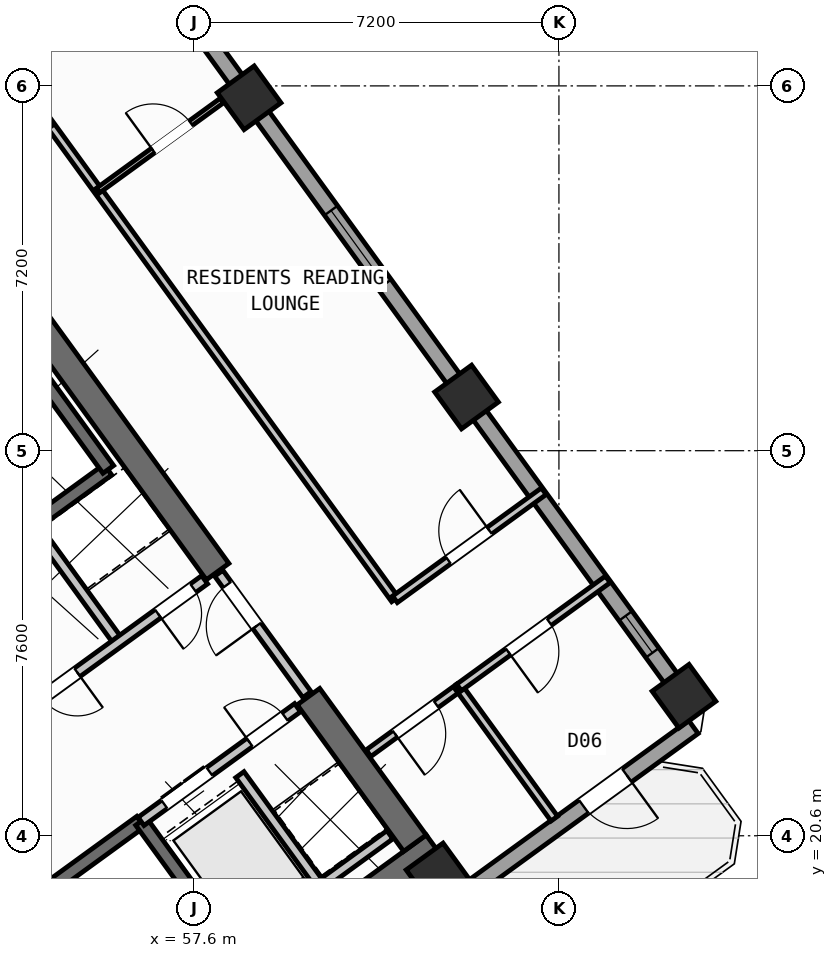
"""IFC4 building model, lengths in metres.
Left out: names, types, materials, properties, quantities, classifications, styles, units other than length and angle.
Written with IfcOpenShell. Run it as: python <this file> out.ifc"""

import sys

from ifc_helpers import new_model, si_unit, direction, frame, frame_2d, origin, origin_2d, place, context, subcontext, project, spatial, rectangle, hollow_rectangle, extrude, source, transform, mapped, element, fill, save


model = new_model("IFC4")
c1 = context("Model", 3, precision=1e-05, world=origin(), true_north=direction((0.0, 1.0)))
c2 = subcontext(c1, "Body", "Model", "MODEL_VIEW")
j1 = project(units=[si_unit("LENGTHUNIT", "METRE"), si_unit("PLANEANGLEUNIT", "RADIAN")], contexts=[c1])
p1 = place(None, origin())
s1 = spatial("IfcSite", under=j1, at=p1, CompositionType="ELEMENT")
p2 = place(p1, origin())
s2 = spatial("IfcBuilding", under=s1, at=p2, CompositionType="ELEMENT")
p3 = place(p2, frame((0.0, 0.0, 112.5)))
s3 = spatial("IfcBuildingStorey", under=s2, at=p3, CompositionType="ELEMENT", Elevation=112.5)
p4 = place(p3, frame((52.359, 13.14, 0.0), z_axis=(0.0, 0.0, 1.0), x_axis=(0.809014896919, 0.587788139183, 0.0)))
e1 = element("IfcWall", 1, at=p4, inside=s3, PredefinedType="SHEAR", context=c2, shape_type="SweptSolid", body=[
    extrude(rectangle(XDim=12.34, YDim=0.55, at=frame_2d((6.17, 0.0))), origin(), (0.0, 0.0, 1.0), 3.35),
])
p5 = place(p3, frame((61.958, 20.454, 0.0), z_axis=(0.0, 0.0, 1.0), x_axis=(-0.587802113096, 0.809004744015, 0.0)))
e2 = element("IfcWall", 2, at=p5, inside=s3, PredefinedType="SHEAR", context=c2, shape_type="SweptSolid", body=[
    extrude(rectangle(XDim=3.575, YDim=0.55, at=frame_2d((1.788, 0.0))), origin(), (0.0, 0.0, 1.0), 3.35),
])
p6 = place(p3, frame((58.064, 25.813, 0.0), z_axis=(0.0, 0.0, 1.0), x_axis=(-0.587764933797, 0.809031756236, 0.0)))
e3 = element("IfcWall", 3, at=p6, inside=s3, PredefinedType="SHEAR", context=c2, shape_type="SweptSolid", body=[
    extrude(rectangle(XDim=6.425, YDim=0.55, at=frame_2d((3.212, 0.0))), origin(), (0.0, 0.0, 1.0), 3.35),
])
m1 = source(origin(), c2, "Body", "SweptSolid", [
    extrude(hollow_rectangle(XDim=0.9, YDim=0.9, WallThickness=0.036, at=origin_2d()), origin(), (0.0, 0.0, 1.0), 3.6),
])
for number, where, z_axis, x_axis in (
    (4, (62.414, 19.827, 0.0), (0.0, 0.0, 1.0), (0.809, 0.588, 0.0)),
    (5, (67.268, 23.354, 0.0), (0.0, 0.0, 1.0), (0.809, 0.588, 0.0)),
    (6, (62.977, 29.259, 0.0), (0.0, 0.0, 1.0), (0.809, 0.588, 0.0)),
    (7, (58.686, 35.165, 0.0), (0.0, 0.0, 1.0), (0.809, 0.588, 0.0)),
):
    element("IfcColumn", number, at=place(p3, frame(where, z_axis=z_axis, x_axis=x_axis)), inside=s3, PredefinedType="COLUMN", context=c2, shape_type="MappedRepresentation", body=[
        mapped(m1, transform((0.0, 0.0, 0.0), scale=1.0)),
    ])
p7 = place(p3, frame((54.81, 40.5, 0.0), z_axis=(0.0, 0.0, 1.0), x_axis=(0.587783625747, -0.809018176127, 0.0)))
e8 = element("IfcWall", 8, at=p7, inside=s3, PredefinedType="STANDARD", context=c2, shape_type="SweptSolid", body=[
    extrude(rectangle(XDim=21.587, YDim=0.32, at=frame_2d((10.794, 0.0))), origin(), (0.0, 0.0, 1.0), 2.775),
])
p8 = place(p7, frame((2.381, 0.0, 0.8)))
e9 = element("IfcOpeningElement", 9, at=p8, cuts=e8, PredefinedType="OPENING", context=c2, shape_type="SweptSolid", body=[
    extrude(rectangle(XDim=2.1, YDim=1.55, at=frame_2d((1.05, 0.775))), frame((0.0, 0.17, 0.0), z_axis=(0.0, -1.0, 0.0), x_axis=(1.0, 0.0, 0.0)), (0.0, 0.0, 1.0), 0.34),
])
p9 = place(p7, frame((9.344, 0.0, 0.85)))
e10 = element("IfcOpeningElement", 10, at=p9, cuts=e8, PredefinedType="OPENING", context=c2, shape_type="SweptSolid", body=[
    extrude(rectangle(XDim=1.8, YDim=1.5, at=frame_2d((0.9, 0.75))), frame((0.0, 0.17, 0.0), z_axis=(0.0, -1.0, 0.0), x_axis=(1.0, 0.0, 0.0)), (0.0, 0.0, 1.0), 0.34),
])
p10 = place(p7, frame((19.234, 0.0, 1.0)))
e11 = element("IfcOpeningElement", 11, at=p10, cuts=e8, PredefinedType="OPENING", context=c2, shape_type="SweptSolid", body=[
    extrude(rectangle(XDim=0.9, YDim=1.25, at=frame_2d((0.45, 0.625))), frame((0.0, 0.17, 0.0), z_axis=(0.0, -1.0, 0.0), x_axis=(1.0, 0.0, 0.0)), (0.0, 0.0, 1.0), 0.34),
])
p11 = place(p3, frame((67.454, 22.747, 0.0), z_axis=(0.0, 0.0, 1.0), x_axis=(-0.809021120468, -0.587779573171, 0.0)))
e12 = element("IfcWall", 12, at=p11, inside=s3, PredefinedType="STANDARD", context=c2, shape_type="SweptSolid", body=[
    extrude(rectangle(XDim=17.588, YDim=0.32, at=frame_2d((8.794, 0.0))), origin(), (0.0, 0.0, 1.0), 3.35),
])
p12 = place(p11, frame((1.624, 0.0, 0.0)))
e13 = element("IfcOpeningElement", 13, at=p12, cuts=e12, PredefinedType="OPENING", context=c2, shape_type="SweptSolid", body=[
    extrude(rectangle(XDim=1.05, YDim=2.15, at=frame_2d((0.525, 1.075))), frame((0.0, 0.17, 0.0), z_axis=(0.0, -1.0, 0.0), x_axis=(1.0, 0.0, 0.0)), (0.0, 0.0, 1.0), 0.34),
])
p13 = place(p11, frame((8.144, 0.0, 0.8)))
e14 = element("IfcOpeningElement", 14, at=p13, cuts=e12, PredefinedType="OPENING", context=c2, shape_type="SweptSolid", body=[
    extrude(rectangle(XDim=2.1, YDim=1.55, at=frame_2d((1.05, 0.775))), frame((0.0, 0.17, 0.0), z_axis=(0.0, -1.0, 0.0), x_axis=(1.0, 0.0, 0.0)), (0.0, 0.0, 1.0), 0.34),
])
p14 = place(p11, frame((13.344, 0.0, 0.8)))
e15 = element("IfcOpeningElement", 15, at=p14, cuts=e12, PredefinedType="OPENING", context=c2, shape_type="SweptSolid", body=[
    extrude(rectangle(XDim=2.1, YDim=1.55, at=frame_2d((1.05, 0.775))), frame((0.0, 0.17, 0.0), z_axis=(0.0, -1.0, 0.0), x_axis=(1.0, 0.0, 0.0)), (0.0, 0.0, 1.0), 0.34),
])
p15 = place(p3, frame((49.863, 23.44, 0.0), z_axis=(0.0, 0.0, 1.0), x_axis=(0.809003474932, 0.587803859759, 0.0)))
e16 = element("IfcWall", 16, at=p15, inside=s3, PredefinedType="SHEAR", context=c2, shape_type="SweptSolid", body=[
    extrude(rectangle(XDim=7.46, YDim=0.26, at=frame_2d((3.73, 0.0))), origin(), (0.0, 0.0, 1.0), 3.35),
])
p16 = place(p15, frame((0.36, 0.0, 0.0)))
e17 = element("IfcOpeningElement", 17, at=p16, cuts=e16, PredefinedType="OPENING", context=c2, shape_type="SweptSolid", body=[
    extrude(rectangle(XDim=0.86, YDim=2.05, at=frame_2d((0.43, 1.025))), frame((0.0, 0.14, 0.0), z_axis=(0.0, -1.0, 0.0), x_axis=(1.0, 0.0, 0.0)), (0.0, 0.0, 1.0), 0.28),
])
p17 = place(p3, frame((55.906, 27.831, 0.0), z_axis=(0.0, 0.0, 1.0), x_axis=(-0.587804123638, 0.809003283204, 0.0)))
e18 = element("IfcWall", 18, at=p17, inside=s3, PredefinedType="SHEAR", context=c2, shape_type="SweptSolid", body=[
    extrude(rectangle(XDim=3.16, YDim=0.26, at=frame_2d((1.58, 0.0))), origin(), (0.0, 0.0, 1.0), 3.35),
])
p18 = place(p3, frame((50.615, 16.57, 0.0), z_axis=(0.0, 0.0, 1.0), x_axis=(0.809028366311, 0.587769599847, 0.0)))
e19 = element("IfcWall", 19, at=p18, inside=s3, PredefinedType="SHEAR", context=c2, shape_type="SweptSolid", body=[
    extrude(rectangle(XDim=7.33, YDim=0.26, at=frame_2d((3.665, 0.0))), origin(), (0.0, 0.0, 1.0), 3.35),
])
p19 = place(p18, frame((0.22, 0.0, 0.0)))
e20 = element("IfcOpeningElement", 20, at=p19, cuts=e19, PredefinedType="OPENING", context=c2, shape_type="SweptSolid", body=[
    extrude(rectangle(XDim=1.1, YDim=2.1, at=frame_2d((0.55, 1.05))), frame((0.0, 0.14, 0.0), z_axis=(0.0, -1.0, 0.0), x_axis=(1.0, 0.0, 0.0)), (0.0, 0.0, 1.0), 0.28),
])
p20 = place(p3, frame((58.41, 18.327, 0.0), z_axis=(0.0, 0.0, 1.0), x_axis=(-0.58776738483, 0.809029975545, 0.0)))
e21 = element("IfcWall", 21, at=p20, inside=s3, PredefinedType="SHEAR", context=c2, shape_type="SweptSolid", body=[
    extrude(rectangle(XDim=3.16, YDim=0.26, at=frame_2d((1.58, 0.0))), origin(), (0.0, 0.0, 1.0), 3.35),
])
p21 = place(p3, frame((56.553, 20.884, 0.0), z_axis=(0.0, 0.0, 1.0), x_axis=(0.809023564264, 0.58777620951, 0.0)))
e22 = element("IfcWall", 22, at=p21, inside=s3, PredefinedType="STANDARD", context=c2, shape_type="SweptSolid", body=[
    extrude(rectangle(XDim=3.818, YDim=0.2, at=frame_2d((1.909, 0.0))), origin(), (0.0, 0.0, 1.0), 3.34),
])
p22 = place(p21, frame((0.57, 0.0, 0.0)))
e23 = element("IfcOpeningElement", 23, at=p22, cuts=e22, PredefinedType="OPENING", context=c2, shape_type="SweptSolid", body=[
    extrude(rectangle(XDim=1.1, YDim=2.15, at=frame_2d((0.55, 1.075))), frame((0.0, 0.11, 0.0), z_axis=(0.0, -1.0, 0.0), x_axis=(1.0, 0.0, 0.0)), (0.0, 0.0, 1.0), 0.22),
])
p23 = place(p21, frame((2.65, 0.0, 0.0)))
e24 = element("IfcOpeningElement", 24, at=p23, cuts=e22, PredefinedType="OPENING", context=c2, shape_type="SweptSolid", body=[
    extrude(rectangle(XDim=0.86, YDim=2.05, at=frame_2d((0.43, 1.025))), frame((0.0, 0.11, 0.0), z_axis=(0.0, -1.0, 0.0), x_axis=(1.0, 0.0, 0.0)), (0.0, 0.0, 1.0), 0.22),
])
p24 = place(p3, frame((60.067, 19.655, 0.0), z_axis=(0.0, 0.0, 1.0), x_axis=(-0.587800520745, 0.809005900975, 0.0)))
e25 = element("IfcWall", 25, at=p24, inside=s3, PredefinedType="STANDARD", context=c2, shape_type="SweptSolid", body=[
    extrude(rectangle(XDim=2.66, YDim=0.2, at=frame_2d((1.33, 0.0))), origin(), (0.0, 0.0, 1.0), 3.34),
])
p25 = place(p3, frame((58.472, 18.447, 0.0), z_axis=(0.0, 0.0, 1.0), x_axis=(0.809018631237, 0.587782999339, 0.0)))
e26 = element("IfcWall", 26, at=p25, inside=s3, PredefinedType="STANDARD", context=c2, shape_type="SweptSolid", body=[
    extrude(rectangle(XDim=3.698, YDim=0.2, at=frame_2d((1.849, 0.0))), origin(), (0.0, 0.0, 1.0), 3.34),
])
p26 = place(p3, frame((56.111, 24.419, 0.0), z_axis=(0.0, 0.0, 1.0), x_axis=(-0.58777848983, 0.809021907548, 0.0)))
e27 = element("IfcWall", 27, at=p26, inside=s3, PredefinedType="STANDARD", context=c2, shape_type="SweptSolid", body=[
    extrude(rectangle(XDim=2.88, YDim=0.2, at=frame_2d((1.44, 0.0))), origin(), (0.0, 0.0, 1.0), 3.34),
])
p27 = place(p3, frame((53.425, 22.468, 0.0), z_axis=(0.0, 0.0, 1.0), x_axis=(0.809024377198, 0.587775090574, 0.0)))
e28 = element("IfcWall", 28, at=p27, inside=s3, PredefinedType="STANDARD", context=c2, shape_type="SweptSolid", body=[
    extrude(rectangle(XDim=5.418, YDim=0.2, at=frame_2d((2.709, 0.0))), origin(), (0.0, 0.0, 1.0), 3.34),
])
p28 = place(p27, frame((4.28, 0.0, 0.0)))
e29 = element("IfcOpeningElement", 29, at=p28, cuts=e28, PredefinedType="OPENING", context=c2, shape_type="SweptSolid", body=[
    extrude(rectangle(XDim=0.86, YDim=2.05, at=frame_2d((0.43, 1.025))), frame((0.0, 0.11, 0.0), z_axis=(0.0, -1.0, 0.0), x_axis=(1.0, 0.0, 0.0)), (0.0, 0.0, 1.0), 0.22),
])
p29 = place(p27, frame((1.45, 0.0, 0.0)))
e30 = element("IfcOpeningElement", 30, at=p29, cuts=e28, PredefinedType="OPENING", context=c2, shape_type="SweptSolid", body=[
    extrude(rectangle(XDim=0.86, YDim=2.05, at=frame_2d((0.43, 1.025))), frame((0.0, 0.11, 0.0), z_axis=(0.0, -1.0, 0.0), x_axis=(1.0, 0.0, 0.0)), (0.0, 0.0, 1.0), 0.22),
])
p30 = place(p3, frame((59.827, 23.386, 0.0), z_axis=(0.0, 0.0, 1.0), x_axis=(-0.587803840107, 0.809003489211, 0.0)))
e31 = element("IfcWall", 31, at=p30, inside=s3, PredefinedType="STANDARD", context=c2, shape_type="SweptSolid", body=[
    extrude(rectangle(XDim=2.96, YDim=0.2, at=frame_2d((1.48, 0.0))), origin(), (0.0, 0.0, 1.0), 3.34),
])
p31 = place(p30, frame((1.68, 0.0, 0.0)))
e32 = element("IfcOpeningElement", 32, at=p31, cuts=e31, PredefinedType="OPENING", context=c2, shape_type="SweptSolid", body=[
    extrude(rectangle(XDim=1.0, YDim=2.1, at=frame_2d((0.5, 1.05))), frame((0.0, 0.11, 0.0), z_axis=(0.0, -1.0, 0.0), x_axis=(1.0, 0.0, 0.0)), (0.0, 0.0, 1.0), 0.22),
])
p32 = place(p3, frame((61.042, 22.229, 0.0), z_axis=(0.0, 0.0, 1.0), x_axis=(0.809075443949, 0.587704794942, 0.0)))
e33 = element("IfcWall", 33, at=p32, inside=s3, PredefinedType="PARTITIONING", context=c2, shape_type="SweptSolid", body=[
    extrude(rectangle(XDim=2.208, YDim=0.16, at=frame_2d((1.104, 0.0))), origin(), (0.0, 0.0, 1.0), 3.34),
])
p33 = place(p32, frame((0.648, 0.0, 0.0)))
e34 = element("IfcOpeningElement", 34, at=p33, cuts=e33, PredefinedType="OPENING", context=c2, shape_type="SweptSolid", body=[
    extrude(rectangle(XDim=1.0, YDim=2.1, at=frame_2d((0.5, 1.05))), frame((0.0, 0.09, 0.0), z_axis=(0.0, -1.0, 0.0), x_axis=(1.0, 0.0, 0.0)), (0.0, 0.0, 1.0), 0.18),
])
p34 = place(p3, frame((52.739, 33.143, 0.0), z_axis=(0.0, 0.0, 1.0), x_axis=(0.809000999347, 0.58780726693, 0.0)))
e35 = element("IfcWall", 35, at=p34, inside=s3, PredefinedType="PARTITIONING", context=c2, shape_type="SweptSolid", body=[
    extrude(rectangle(XDim=2.51, YDim=0.16, at=frame_2d((1.255, 0.0))), origin(), (0.0, 0.0, 1.0), 3.34),
])
p35 = place(p3, frame((64.709, 20.938, 0.0), z_axis=(0.0, 0.0, 1.0), x_axis=(-0.587772420479, 0.809026317077, 0.0)))
e36 = element("IfcWall", 36, at=p35, inside=s3, PredefinedType="PARTITIONING", context=c2, shape_type="SweptSolid", body=[
    extrude(rectangle(XDim=3.2, YDim=0.16, at=frame_2d((1.6, 0.0))), origin(), (0.0, 0.0, 1.0), 3.34),
])
p36 = place(p3, frame((61.564, 25.266, 0.0), z_axis=(0.0, 0.0, 1.0), x_axis=(-0.587784527444, 0.809017521007, 0.0)))
e37 = element("IfcWall", 37, at=p36, inside=s3, PredefinedType="PARTITIONING", context=c2, shape_type="SweptSolid", body=[
    extrude(rectangle(XDim=16.35, YDim=0.16, at=frame_2d((8.175, 0.0))), origin(), (0.0, 0.0, 1.0), 3.34),
])
p37 = place(p3, frame((62.828, 23.527, 0.0), z_axis=(0.0, 0.0, 1.0), x_axis=(0.809003564202, 0.587803736896, 0.0)))
e38 = element("IfcWall", 38, at=p37, inside=s3, PredefinedType="PARTITIONING", context=c2, shape_type="SweptSolid", body=[
    extrude(rectangle(XDim=3.63, YDim=0.16, at=frame_2d((1.815, 0.0))), origin(), (0.0, 0.0, 1.0), 3.34),
])
p38 = place(p37, frame((1.2, 0.0, 0.0)))
e39 = element("IfcOpeningElement", 39, at=p38, cuts=e38, PredefinedType="OPENING", context=c2, shape_type="SweptSolid", body=[
    extrude(rectangle(XDim=1.0, YDim=2.1, at=frame_2d((0.5, 1.05))), frame((0.0, 0.09, 0.0), z_axis=(0.0, -1.0, 0.0), x_axis=(1.0, 0.0, 0.0)), (0.0, 0.0, 1.0), 0.18),
])
p39 = place(p3, frame((61.564, 25.266, 0.0), z_axis=(0.0, 0.0, 1.0), x_axis=(0.809012309495, 0.587791700422, 0.0)))
e40 = element("IfcWall", 40, at=p39, inside=s3, PredefinedType="PARTITIONING", context=c2, shape_type="SweptSolid", body=[
    extrude(rectangle(XDim=3.63, YDim=0.16, at=frame_2d((1.815, 0.0))), origin(), (0.0, 0.0, 1.0), 3.34),
])
p40 = place(p39, frame((1.305, 0.0, 0.0)))
e41 = element("IfcOpeningElement", 41, at=p40, cuts=e40, PredefinedType="OPENING", context=c2, shape_type="SweptSolid", body=[
    extrude(rectangle(XDim=1.0, YDim=2.1, at=frame_2d((0.5, 1.05))), frame((0.0, 0.09, 0.0), z_axis=(0.0, -1.0, 0.0), x_axis=(1.0, 0.0, 0.0)), (0.0, 0.0, 1.0), 0.18),
])
p41 = place(p3, frame((55.703, 33.334, 0.0), z_axis=(0.0, 0.0, 1.0), x_axis=(0.809021891479, 0.587778511948, 0.0)))
e42 = element("IfcWall", 42, at=p41, inside=s3, PredefinedType="PARTITIONING", context=c2, shape_type="SweptSolid", body=[
    extrude(rectangle(XDim=3.028, YDim=0.11, at=frame_2d((1.514, 0.0))), origin(), (0.0, 0.0, 1.0), 2.775),
])
p42 = place(p41, frame((1.345, 0.0, 0.0)))
e43 = element("IfcOpeningElement", 43, at=p42, cuts=e42, PredefinedType="OPENING", context=c2, shape_type="SweptSolid", body=[
    extrude(rectangle(XDim=0.92, YDim=2.08, at=frame_2d((0.46, 1.04))), frame((0.0, 0.065, 0.0), z_axis=(0.0, -1.0, 0.0), x_axis=(1.0, 0.0, 0.0)), (0.0, 0.0, 1.0), 0.13),
])
m2 = source(origin(), c2, "Body", "SweptSolid", [
    extrude(rectangle(XDim=1.05, YDim=2.15, at=frame_2d((0.525, 1.075))), frame((0.0, 0.025, 0.0), z_axis=(0.0, -1.0, 0.0), x_axis=(1.0, 0.0, 0.0)), (0.0, 0.0, 1.0), 0.05),
])
p43 = place(p12, origin())
e44 = element("IfcDoor", 44, at=p43, inside=s3, OperationType="SINGLE_SWING_LEFT", PredefinedType="DOOR", context=c2, shape_type="MappedRepresentation", body=[
    mapped(m2, transform((0.0, 0.0, 0.0), scale=1.0)),
])
fill(e13, e44)
m3 = source(origin(), c2, "Body", "SweptSolid", [
    extrude(rectangle(XDim=1.8, YDim=1.5, at=frame_2d((0.9, 0.75))), frame((0.0, 0.03, 0.0), z_axis=(0.0, -1.0, 0.0), x_axis=(1.0, 0.0, 0.0)), (0.0, 0.0, 1.0), 0.06),
])
p44 = place(p9, origin())
e45 = element("IfcWindow", 45, at=p44, inside=s3, PartitioningType="SINGLE_PANEL", PredefinedType="WINDOW", context=c2, shape_type="MappedRepresentation", body=[
    mapped(m3, transform((0.0, 0.0, 0.0), scale=1.0)),
])
fill(e10, e45)
m4 = source(origin(), c2, "Body", "SweptSolid", [
    extrude(rectangle(XDim=0.9, YDim=1.25, at=frame_2d((0.45, 0.625))), frame((0.0, 0.03, 0.0), z_axis=(0.0, -1.0, 0.0), x_axis=(1.0, 0.0, 0.0)), (0.0, 0.0, 1.0), 0.06),
])
p45 = place(p10, origin())
e46 = element("IfcWindow", 46, at=p45, inside=s3, PartitioningType="SINGLE_PANEL", PredefinedType="WINDOW", context=c2, shape_type="MappedRepresentation", body=[
    mapped(m4, transform((0.0, 0.0, 0.0), scale=1.0)),
])
fill(e11, e46)
m5 = source(origin(), c2, "Body", "SweptSolid", [
    extrude(rectangle(XDim=1.1, YDim=2.15, at=frame_2d((0.55, 1.075))), frame((0.0, 0.025, 0.0), z_axis=(0.0, -1.0, 0.0), x_axis=(1.0, 0.0, 0.0)), (0.0, 0.0, 1.0), 0.05),
])
p46 = place(p22, origin())
e47 = element("IfcDoor", 47, at=p46, inside=s3, OperationType="DOUBLE_DOOR_SLIDING", PredefinedType="DOOR", context=c2, shape_type="MappedRepresentation", body=[
    mapped(m5, transform((0.0, 0.0, 0.0), scale=1.0)),
])
fill(e23, e47)
m6 = source(origin(), c2, "Body", "SweptSolid", [
    extrude(rectangle(XDim=0.86, YDim=2.05, at=frame_2d((0.43, 1.025))), frame((0.0, 0.025, 0.0), z_axis=(0.0, -1.0, 0.0), x_axis=(1.0, 0.0, 0.0)), (0.0, 0.0, 1.0), 0.05),
])
p47 = place(p23, origin())
e48 = element("IfcDoor", 48, at=p47, inside=s3, OperationType="SINGLE_SWING_LEFT", PredefinedType="DOOR", context=c2, shape_type="MappedRepresentation", body=[
    mapped(m6, transform((0.0, 0.0, 0.0), scale=1.0)),
])
fill(e24, e48)
p48 = place(p28, frame((0.86, 0.0, 0.0), z_axis=(0.0, 0.0, 1.0), x_axis=(-1.0, 0.0, 0.0)))
e49 = element("IfcDoor", 49, at=p48, inside=s3, OperationType="SINGLE_SWING_RIGHT", PredefinedType="DOOR", context=c2, shape_type="MappedRepresentation", body=[
    mapped(m6, transform((0.0, 0.0, 0.0), scale=1.0)),
])
fill(e29, e49)
p49 = place(p29, frame((0.86, 0.0, 0.0), z_axis=(0.0, 0.0, 1.0), x_axis=(-1.0, 0.0, 0.0)))
e50 = element("IfcDoor", 50, at=p49, inside=s3, OperationType="SINGLE_SWING_LEFT", PredefinedType="DOOR", context=c2, shape_type="MappedRepresentation", body=[
    mapped(m6, transform((0.0, 0.0, 0.0), scale=1.0)),
])
fill(e30, e50)
m7 = source(origin(), c2, "Body", "SweptSolid", [
    extrude(rectangle(XDim=1.0, YDim=2.1, at=frame_2d((0.5, 1.05))), frame((0.0, 0.025, 0.0), z_axis=(0.0, -1.0, 0.0), x_axis=(1.0, 0.0, 0.0)), (0.0, 0.0, 1.0), 0.05),
])
p50 = place(p33, frame((1.0, 0.0, 0.0), z_axis=(0.0, 0.0, 1.0), x_axis=(-1.0, 0.0, 0.0)))
e51 = element("IfcDoor", 51, at=p50, inside=s3, OperationType="SINGLE_SWING_RIGHT", PredefinedType="DOOR", context=c2, shape_type="MappedRepresentation", body=[
    mapped(m7, transform((0.0, 0.0, 0.0), scale=1.0)),
])
fill(e34, e51)
p51 = place(p31, origin())
e52 = element("IfcDoor", 52, at=p51, inside=s3, OperationType="SINGLE_SWING_LEFT", PredefinedType="DOOR", context=c2, shape_type="MappedRepresentation", body=[
    mapped(m7, transform((0.0, 0.0, 0.0), scale=1.0)),
])
fill(e32, e52)
p52 = place(p40, origin())
e53 = element("IfcDoor", 53, at=p52, inside=s3, OperationType="SINGLE_SWING_RIGHT", PredefinedType="DOOR", context=c2, shape_type="MappedRepresentation", body=[
    mapped(m7, transform((0.0, 0.0, 0.0), scale=1.0)),
])
fill(e41, e53)
m8 = source(origin(), c2, "Body", "SweptSolid", [
    extrude(rectangle(XDim=0.92, YDim=2.08, at=frame_2d((0.46, 1.04))), frame((0.0, 0.025, 0.0), z_axis=(0.0, -1.0, 0.0), x_axis=(1.0, 0.0, 0.0)), (0.0, 0.0, 1.0), 0.05),
])
p53 = place(p42, origin())
e54 = element("IfcDoor", 54, at=p53, inside=s3, OperationType="SINGLE_SWING_LEFT", PredefinedType="DOOR", context=c2, shape_type="MappedRepresentation", body=[
    mapped(m8, transform((0.0, 0.0, 0.0), scale=1.0)),
])
fill(e43, e54)
p54 = place(p38, frame((1.0, 0.0, 0.0), z_axis=(0.0, 0.0, 1.0), x_axis=(-1.0, 0.0, 0.0)))
e55 = element("IfcDoor", 55, at=p54, inside=s3, OperationType="SINGLE_SWING_RIGHT", PredefinedType="DOOR", context=c2, shape_type="MappedRepresentation", body=[
    mapped(m7, transform((0.0, 0.0, 0.0), scale=1.0)),
])
fill(e39, e55)
save(model, sys.argv[1])
